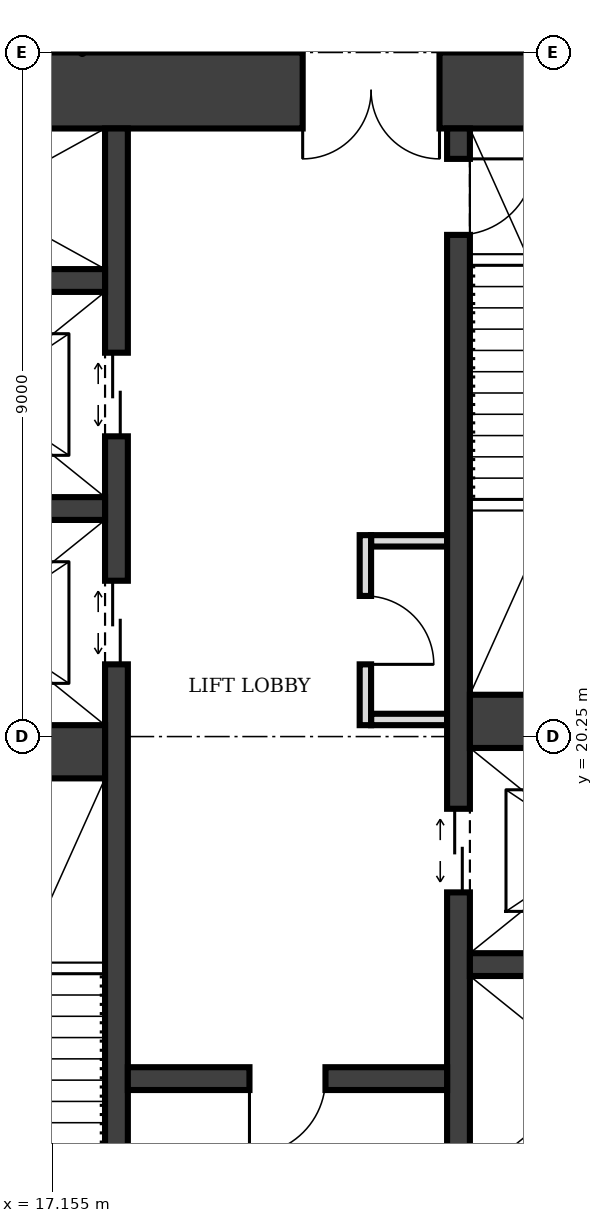
"""IFC4 building model, lengths in metres.
Left out: names, types, materials, properties, quantities, classifications, styles, units other than length and angle.
Written with IfcOpenShell. Run it as: python <this file> out.ifc"""

import sys

from ifc_helpers import new_model, si_unit, direction, frame, frame_2d, origin, place, context, subcontext, project, spatial, rectangle, extrude, element, fill, save


model = new_model("IFC4")
c1 = context("Model", 3, precision=1e-05, world=origin(), true_north=direction((0.0, 1.0)))
c2 = subcontext(c1, "Body", "Model", "MODEL_VIEW")
j1 = project(units=[si_unit("LENGTHUNIT", "METRE"), si_unit("PLANEANGLEUNIT", "RADIAN")], contexts=[c1])
p1 = place(None, origin())
s1 = spatial("IfcSite", under=j1, at=p1, CompositionType="ELEMENT")
p2 = place(p1, origin())
s2 = spatial("IfcBuilding", under=s1, at=p2, CompositionType="ELEMENT")
p3 = place(p2, frame((0.0, 0.0, 93.0)))
s3 = spatial("IfcBuildingStorey", under=s2, at=p3, CompositionType="ELEMENT", Elevation=93.0)
p4 = place(p3, frame((27.0, 28.75, 0.0), z_axis=(0.0, 0.0, 1.0), x_axis=(-1.0, 0.0, 0.0)))
e1 = element("IfcWall", 1, at=p4, inside=s3, PredefinedType="SHEAR", context=c2, shape_type="SweptSolid", body=[
    extrude(rectangle(XDim=13.5, YDim=1.0, at=frame_2d((6.75, 0.0))), origin(), (0.0, 0.0, 1.0), 4.0),
])
p5 = place(p4, frame((4.75, 0.0, 0.0)))
e2 = element("IfcOpeningElement", 2, at=p5, cuts=e1, PredefinedType="OPENING", context=c2, shape_type="SweptSolid", body=[
    extrude(rectangle(XDim=1.8, YDim=2.1, at=frame_2d((0.9, 1.05))), frame((0.0, 0.51, 0.0), z_axis=(0.0, -1.0, 0.0), x_axis=(1.0, 0.0, 0.0)), (0.0, 0.0, 1.0), 1.02),
])
p6 = place(p3, frame((18.0, 12.25, 0.0), z_axis=(0.0, 0.0, 1.0), x_axis=(0.0, 1.0, 0.0)))
e3 = element("IfcWall", 3, at=p6, inside=s3, PredefinedType="SHEAR", context=c2, shape_type="SweptSolid", body=[
    extrude(rectangle(XDim=16.0, YDim=0.3, at=frame_2d((8.0, 0.0))), origin(), (0.0, 0.0, 1.0), 4.0),
])
p7 = place(p6, frame((0.4, 0.0, 0.0)))
e4 = element("IfcOpeningElement", 4, at=p7, cuts=e3, PredefinedType="OPENING", context=c2, shape_type="SweptSolid", body=[
    extrude(rectangle(XDim=1.0, YDim=2.1, at=frame_2d((0.5, 1.05))), frame((0.0, 0.16, 0.0), z_axis=(0.0, -1.0, 0.0), x_axis=(1.0, 0.0, 0.0)), (0.0, 0.0, 1.0), 0.32),
])
p8 = place(p6, frame((8.95, 0.0, 0.0)))
e5 = element("IfcOpeningElement", 5, at=p8, cuts=e3, PredefinedType="OPENING", context=c2, shape_type="SweptSolid", body=[
    extrude(rectangle(XDim=1.1, YDim=2.1, at=frame_2d((0.55, 1.05))), frame((0.0, 0.16, 0.0), z_axis=(0.0, -1.0, 0.0), x_axis=(1.0, 0.0, 0.0)), (0.0, 0.0, 1.0), 0.32),
])
p9 = place(p6, frame((11.95, 0.0, 0.0)))
e6 = element("IfcOpeningElement", 6, at=p9, cuts=e3, PredefinedType="OPENING", context=c2, shape_type="SweptSolid", body=[
    extrude(rectangle(XDim=1.1, YDim=2.1, at=frame_2d((0.55, 1.05))), frame((0.0, 0.16, 0.0), z_axis=(0.0, -1.0, 0.0), x_axis=(1.0, 0.0, 0.0)), (0.0, 0.0, 1.0), 0.32),
])
p10 = place(p3, frame((22.5, 12.25, 0.0), z_axis=(0.0, 0.0, 1.0), x_axis=(0.0, 1.0, 0.0)))
e7 = element("IfcWall", 7, at=p10, inside=s3, PredefinedType="SHEAR", context=c2, shape_type="SweptSolid", body=[
    extrude(rectangle(XDim=16.0, YDim=0.3, at=frame_2d((8.0, 0.0))), origin(), (0.0, 0.0, 1.0), 4.0),
])
p11 = place(p10, frame((14.6, 0.0, 0.0)))
e8 = element("IfcOpeningElement", 8, at=p11, cuts=e7, PredefinedType="OPENING", context=c2, shape_type="SweptSolid", body=[
    extrude(rectangle(XDim=1.0, YDim=2.1, at=frame_2d((0.5, 1.05))), frame((0.0, 0.16, 0.0), z_axis=(0.0, -1.0, 0.0), x_axis=(1.0, 0.0, 0.0)), (0.0, 0.0, 1.0), 0.32),
])
p12 = place(p10, frame((0.375, 0.0, 0.0)))
e9 = element("IfcOpeningElement", 9, at=p12, cuts=e7, PredefinedType="OPENING", context=c2, shape_type="SweptSolid", body=[
    extrude(rectangle(XDim=1.1, YDim=2.1, at=frame_2d((0.55, 1.05))), frame((0.0, 0.16, 0.0), z_axis=(0.0, -1.0, 0.0), x_axis=(1.0, 0.0, 0.0)), (0.0, 0.0, 1.0), 0.32),
])
p13 = place(p10, frame((5.95, 0.0, 0.0)))
e10 = element("IfcOpeningElement", 10, at=p13, cuts=e7, PredefinedType="OPENING", context=c2, shape_type="SweptSolid", body=[
    extrude(rectangle(XDim=1.1, YDim=2.1, at=frame_2d((0.55, 1.05))), frame((0.0, 0.16, 0.0), z_axis=(0.0, -1.0, 0.0), x_axis=(1.0, 0.0, 0.0)), (0.0, 0.0, 1.0), 0.32),
])
p14 = place(p3, frame((14.5, 20.05, 0.0), z_axis=(0.0, 0.0, 1.0), x_axis=(1.0, 0.0, 0.0)))
e11 = element("IfcWall", 11, at=p14, inside=s3, PredefinedType="SHEAR", context=c2, shape_type="SweptSolid", body=[
    extrude(rectangle(XDim=3.35, YDim=0.7, at=frame_2d((1.675, 0.0))), origin(), (0.0, 0.0, 1.0), 4.0),
])
p15 = place(p3, frame((18.15, 15.75, 0.0), z_axis=(0.0, 0.0, 1.0), x_axis=(1.0, 0.0, 0.0)))
e12 = element("IfcWall", 12, at=p15, inside=s3, PredefinedType="SHEAR", context=c2, shape_type="SweptSolid", body=[
    extrude(rectangle(XDim=4.2, YDim=0.3, at=frame_2d((2.1, 0.0))), origin(), (0.0, 0.0, 1.0), 4.0),
])
p16 = place(p15, frame((1.6, 0.0, 0.0)))
e13 = element("IfcOpeningElement", 13, at=p16, cuts=e12, PredefinedType="OPENING", context=c2, shape_type="SweptSolid", body=[
    extrude(rectangle(XDim=1.0, YDim=2.1, at=frame_2d((0.5, 1.05))), frame((0.0, 0.16, 0.0), z_axis=(0.0, -1.0, 0.0), x_axis=(1.0, 0.0, 0.0)), (0.0, 0.0, 1.0), 0.32),
])
p17 = place(p3, frame((22.65, 17.25, 0.0), z_axis=(0.0, 0.0, 1.0), x_axis=(1.0, 0.0, 0.0)))
e14 = element("IfcWall", 14, at=p17, inside=s3, PredefinedType="SHEAR", context=c2, shape_type="SweptSolid", body=[
    extrude(rectangle(XDim=3.35, YDim=0.3, at=frame_2d((1.675, 0.0))), origin(), (0.0, 0.0, 1.0), 4.0),
])
p18 = place(p3, frame((22.65, 20.45, 0.0), z_axis=(0.0, 0.0, 1.0), x_axis=(1.0, 0.0, 0.0)))
e15 = element("IfcWall", 15, at=p18, inside=s3, PredefinedType="SHEAR", context=c2, shape_type="SweptSolid", body=[
    extrude(rectangle(XDim=3.35, YDim=0.7, at=frame_2d((1.675, 0.0))), origin(), (0.0, 0.0, 1.0), 4.0),
])
for number, where, z_axis, x_axis in (
    (16, (14.5, 23.25, 0.0), (0.0, 0.0, 1.0), (1.0, 0.0, 0.0)),
    (17, (14.5, 26.25, 0.0), (0.0, 0.0, 1.0), (1.0, 0.0, 0.0)),
):
    element("IfcWall", number, at=place(p3, frame(where, z_axis=z_axis, x_axis=x_axis)), inside=s3, PredefinedType="SHEAR", context=c2, shape_type="SweptSolid", body=[
        extrude(rectangle(XDim=3.35, YDim=0.3, at=frame_2d((1.675, 0.0))), origin(), (0.0, 0.0, 1.0), 4.0),
    ])
p19 = place(p3, frame((21.275, 20.4, 0.0), z_axis=(0.0, 0.0, 1.0), x_axis=(0.0, 1.0, 0.0)))
e18 = element("IfcWall", 18, at=p19, inside=s3, PredefinedType="PARTITIONING", context=c2, shape_type="SweptSolid", body=[
    extrude(rectangle(XDim=2.5, YDim=0.15, at=frame_2d((1.25, 0.0))), origin(), (0.0, 0.0, 1.0), 3.75),
])
p20 = place(p19, frame((0.8, 0.0, 0.0)))
e19 = element("IfcOpeningElement", 19, at=p20, cuts=e18, PredefinedType="OPENING", context=c2, shape_type="SweptSolid", body=[
    extrude(rectangle(XDim=0.9, YDim=2.1, at=frame_2d((0.45, 1.05))), frame((0.0, 0.085, 0.0), z_axis=(0.0, -1.0, 0.0), x_axis=(1.0, 0.0, 0.0)), (0.0, 0.0, 1.0), 0.17),
])
for number, where, z_axis, x_axis in (
    (20, (21.35, 20.475, 0.0), (0.0, 0.0, 1.0), (1.0, 0.0, 0.0)),
    (21, (21.35, 22.825, 0.0), (0.0, 0.0, 1.0), (1.0, 0.0, 0.0)),
):
    element("IfcWall", number, at=place(p3, frame(where, z_axis=z_axis, x_axis=x_axis)), inside=s3, PredefinedType="PARTITIONING", context=c2, shape_type="SweptSolid", body=[
        extrude(rectangle(XDim=1.0, YDim=0.15, at=frame_2d((0.5, 0.0))), origin(), (0.0, 0.0, 1.0), 3.75),
    ])
p21 = place(p5, origin())
e22 = element("IfcDoor", 22, at=p21, inside=s3, OperationType="DOUBLE_DOOR_SINGLE_SWING", PredefinedType="DOOR", context=c2, shape_type="SweptSolid", body=[
    extrude(rectangle(XDim=1.8, YDim=2.1, at=frame_2d((0.9, 1.05))), frame((0.0, 0.025, 0.0), z_axis=(0.0, -1.0, 0.0), x_axis=(1.0, 0.0, 0.0)), (0.0, 0.0, 1.0), 0.05),
])
fill(e2, e22)
p22 = place(p16, frame((1.0, 0.0, 0.0), z_axis=(0.0, 0.0, 1.0), x_axis=(-1.0, 0.0, 0.0)))
e23 = element("IfcDoor", 23, at=p22, inside=s3, OperationType="SINGLE_SWING_RIGHT", PredefinedType="DOOR", context=c2, shape_type="SweptSolid", body=[
    extrude(rectangle(XDim=1.0, YDim=2.1, at=frame_2d((0.5, 1.05))), frame((0.0, 0.025, 0.0), z_axis=(0.0, -1.0, 0.0), x_axis=(1.0, 0.0, 0.0)), (0.0, 0.0, 1.0), 0.05),
])
fill(e13, e23)
p23 = place(p11, frame((1.0, 0.0, 0.0), z_axis=(0.0, 0.0, 1.0), x_axis=(-1.0, 0.0, 0.0)))
e24 = element("IfcDoor", 24, at=p23, inside=s3, OperationType="SINGLE_SWING_LEFT", PredefinedType="DOOR", context=c2, shape_type="SweptSolid", body=[
    extrude(rectangle(XDim=1.0, YDim=2.1, at=frame_2d((0.5, 1.05))), frame((0.0, 0.025, 0.0), z_axis=(0.0, -1.0, 0.0), x_axis=(1.0, 0.0, 0.0)), (0.0, 0.0, 1.0), 0.05),
])
fill(e8, e24)
p24 = place(p8, origin())
e25 = element("IfcDoor", 25, at=p24, inside=s3, OperationType="DOUBLE_DOOR_SLIDING", PredefinedType="DOOR", context=c2, shape_type="SweptSolid", body=[
    extrude(rectangle(XDim=1.1, YDim=2.1, at=frame_2d((0.55, 1.05))), frame((0.0, 0.025, 0.0), z_axis=(0.0, -1.0, 0.0), x_axis=(1.0, 0.0, 0.0)), (0.0, 0.0, 1.0), 0.05),
])
fill(e5, e25)
p25 = place(p9, origin())
e26 = element("IfcDoor", 26, at=p25, inside=s3, OperationType="DOUBLE_DOOR_SLIDING", PredefinedType="DOOR", context=c2, shape_type="SweptSolid", body=[
    extrude(rectangle(XDim=1.1, YDim=2.1, at=frame_2d((0.55, 1.05))), frame((0.0, 0.025, 0.0), z_axis=(0.0, -1.0, 0.0), x_axis=(1.0, 0.0, 0.0)), (0.0, 0.0, 1.0), 0.05),
])
fill(e6, e26)
p26 = place(p13, origin())
e27 = element("IfcDoor", 27, at=p26, inside=s3, OperationType="DOUBLE_DOOR_SLIDING", PredefinedType="DOOR", context=c2, shape_type="SweptSolid", body=[
    extrude(rectangle(XDim=1.1, YDim=2.1, at=frame_2d((0.55, 1.05))), frame((0.0, 0.025, 0.0), z_axis=(0.0, -1.0, 0.0), x_axis=(1.0, 0.0, 0.0)), (0.0, 0.0, 1.0), 0.05),
])
fill(e10, e27)
p27 = place(p20, frame((0.9, 0.0, 0.0), z_axis=(0.0, 0.0, 1.0), x_axis=(-1.0, 0.0, 0.0)))
e28 = element("IfcDoor", 28, at=p27, inside=s3, OperationType="SINGLE_SWING_RIGHT", PredefinedType="DOOR", context=c2, shape_type="SweptSolid", body=[
    extrude(rectangle(XDim=0.9, YDim=2.1, at=frame_2d((0.45, 1.05))), frame((0.0, 0.025, 0.0), z_axis=(0.0, -1.0, 0.0), x_axis=(1.0, 0.0, 0.0)), (0.0, 0.0, 1.0), 0.05),
])
fill(e19, e28)
save(model, sys.argv[1])
